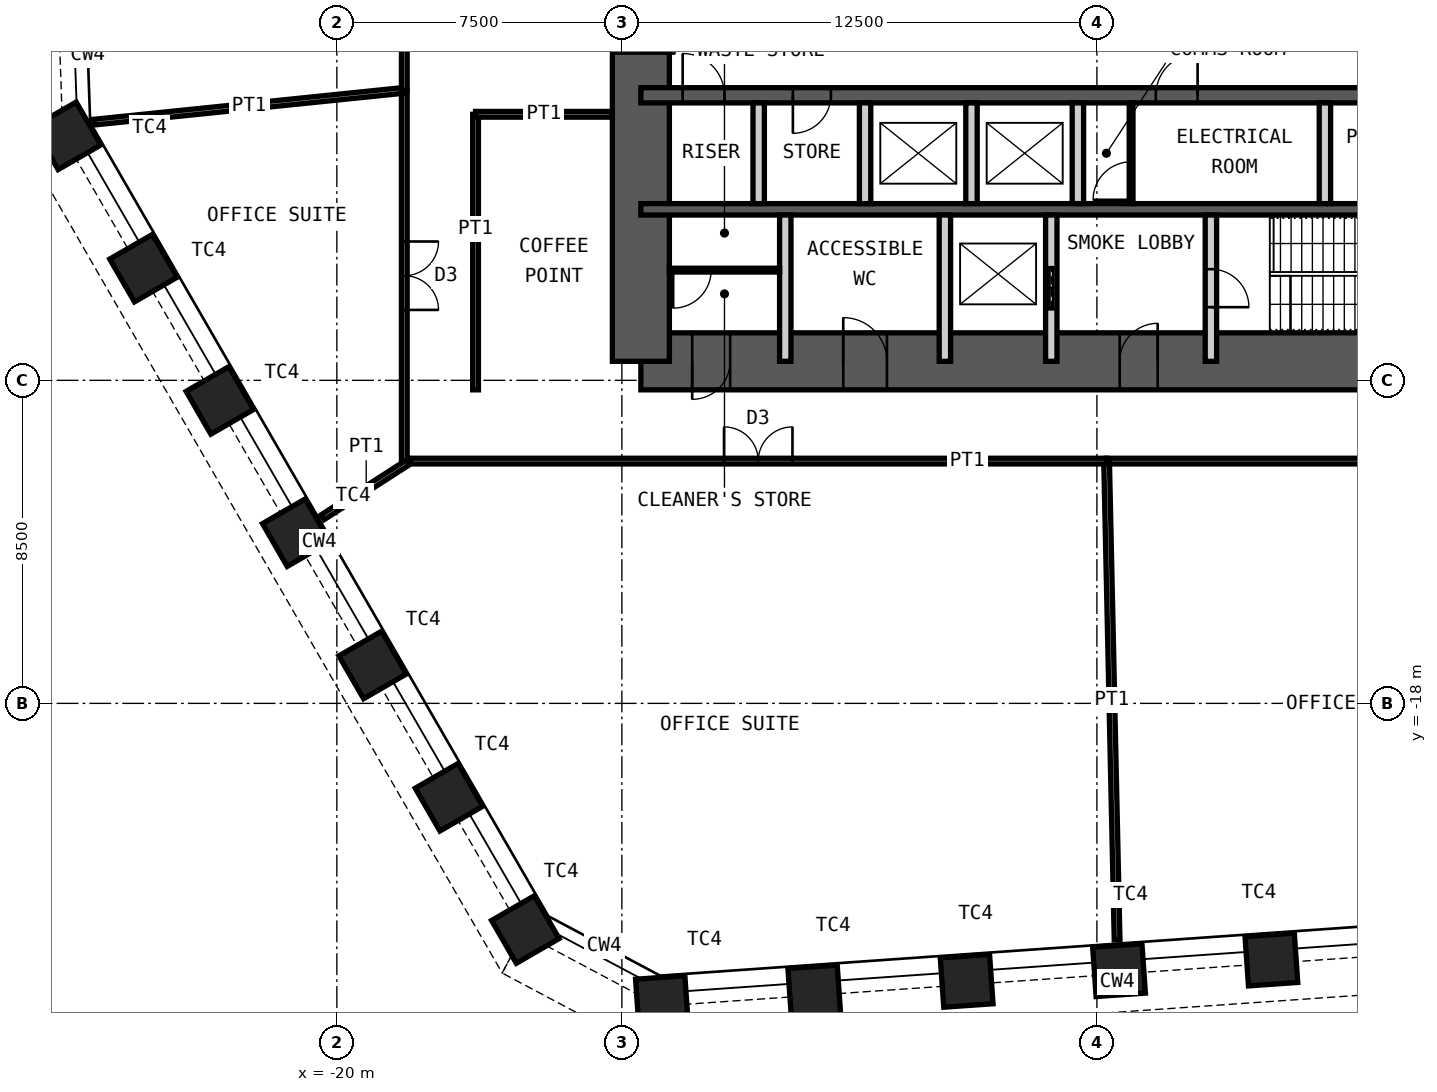
"""IFC4 building model, lengths in metres.
Left out: names, types, materials, properties, quantities, classifications, styles, units other than length and angle.
Written with IfcOpenShell. Run it as: python <this file> out.ifc"""

import sys

from ifc_helpers import new_model, si_unit, direction, frame, frame_2d, origin, origin_2d, place, context, subcontext, project, spatial, rectangle, hollow_rectangle, extrude, element, fill, save


model = new_model("IFC4")
c1 = context("Model", 3, precision=1e-05, world=origin(), true_north=direction((0.0, 1.0)))
c2 = subcontext(c1, "Body", "Model", "MODEL_VIEW")
j1 = project(units=[si_unit("LENGTHUNIT", "METRE"), si_unit("PLANEANGLEUNIT", "RADIAN")], contexts=[c1])
p1 = place(None, origin())
s1 = spatial("IfcSite", under=j1, at=p1, CompositionType="ELEMENT")
p2 = place(p1, origin())
s2 = spatial("IfcBuilding", under=s1, at=p2, CompositionType="ELEMENT")
p3 = place(p2, frame((0.0, 0.0, 140.8)))
s3 = spatial("IfcBuildingStorey", under=s2, at=p3, CompositionType="ELEMENT", Elevation=140.8)
for number, where, z_axis, x_axis in (
    (1, (4.592, -24.74, 0.0), (0.0, 0.0, 1.0), (0.998, 0.07, 0.0)),
    (2, (0.582, -25.02, 0.0), (0.0, 0.0, 1.0), (0.998, 0.07, 0.0)),
    (3, (-3.427, -25.301, 0.0), (0.0, 0.0, 1.0), (0.998, 0.07, 0.0)),
    (4, (-7.436, -25.581, 0.0), (0.0, 0.0, 1.0), (0.998, 0.07, 0.0)),
    (5, (-11.446, -25.861, 0.0), (0.0, 0.0, 1.0), (0.998, 0.07, 0.0)),
    (6, (-15.04, -23.95, 0.0), (0.0, 0.0, 1.0), (0.5, -0.866, 0.0)),
    (7, (-17.049, -20.47, 0.0), (0.0, 0.0, 1.0), (0.5, -0.866, 0.0)),
    (8, (-19.059, -16.989, 0.0), (0.0, 0.0, 1.0), (0.5, -0.866, 0.0)),
    (9, (-21.068, -13.509, 0.0), (0.0, 0.0, 1.0), (0.5, -0.866, 0.0)),
    (10, (-23.078, -10.028, 0.0), (0.0, 0.0, 1.0), (0.5, -0.866, 0.0)),
    (11, (-25.087, -6.547, 0.0), (0.0, 0.0, 1.0), (0.5, -0.866, 0.0)),
    (12, (-27.097, -3.067, 0.0), (0.0, 0.0, 1.0), (0.5, -0.866, 0.0)),
):
    element("IfcColumn", number, at=place(p3, frame(where, z_axis=z_axis, x_axis=x_axis)), inside=s3, PredefinedType="COLUMN", context=c2, shape_type="SweptSolid", body=[
        extrude(hollow_rectangle(XDim=1.3, YDim=1.3, WallThickness=0.1, at=origin_2d()), origin(), (0.0, 0.0, 1.0), 4.2),
    ])
p4 = place(p3, frame((-12.0, -9.0, 0.0), z_axis=(0.0, 0.0, 1.0), x_axis=(1.0, 0.0, 0.0)))
e13 = element("IfcWall", 13, at=p4, inside=s3, PredefinedType="SHEAR", context=c2, shape_type="SweptSolid", body=[
    extrude(rectangle(XDim=24.0, YDim=1.5, at=frame_2d((12.0, 0.0))), origin(), (0.0, 0.0, 1.0), 4.2),
])
p5 = place(p4, frame((1.35, 0.0, 0.0)))
e14 = element("IfcOpeningElement", 14, at=p5, cuts=e13, PredefinedType="OPENING", context=c2, shape_type="SweptSolid", body=[
    extrude(rectangle(XDim=1.0, YDim=2.1, at=frame_2d((0.5, 1.05))), frame((0.0, 0.76, 0.0), z_axis=(0.0, -1.0, 0.0), x_axis=(1.0, 0.0, 0.0)), (0.0, 0.0, 1.0), 1.52),
])
p6 = place(p4, frame((5.325, 0.0, 0.0)))
e15 = element("IfcOpeningElement", 15, at=p6, cuts=e13, PredefinedType="OPENING", context=c2, shape_type="SweptSolid", body=[
    extrude(rectangle(XDim=1.15, YDim=2.1, at=frame_2d((0.575, 1.05))), frame((0.0, 0.76, 0.0), z_axis=(0.0, -1.0, 0.0), x_axis=(1.0, 0.0, 0.0)), (0.0, 0.0, 1.0), 1.52),
])
p7 = place(p4, frame((12.6, 0.0, 0.0)))
e16 = element("IfcOpeningElement", 16, at=p7, cuts=e13, PredefinedType="OPENING", context=c2, shape_type="SweptSolid", body=[
    extrude(rectangle(XDim=1.0, YDim=2.1, at=frame_2d((0.5, 1.05))), frame((0.0, 0.76, 0.0), z_axis=(0.0, -1.0, 0.0), x_axis=(1.0, 0.0, 0.0)), (0.0, 0.0, 1.0), 1.52),
])
p8 = place(p3, frame((-12.0, -9.0, 0.0), z_axis=(0.0, 0.0, 1.0), x_axis=(0.0, 1.0, 0.0)))
e17 = element("IfcWall", 17, at=p8, inside=s3, PredefinedType="SHEAR", context=c2, shape_type="SweptSolid", body=[
    extrude(rectangle(XDim=18.0, YDim=1.5, at=frame_2d((9.0, 0.0))), origin(), (0.0, 0.0, 1.0), 4.2),
])
p9 = place(p8, frame((8.1, 0.0, 0.0)))
e18 = element("IfcOpeningElement", 18, at=p9, cuts=e17, PredefinedType="OPENING", context=c2, shape_type="SweptSolid", body=[
    extrude(rectangle(XDim=1.8, YDim=2.1, at=frame_2d((0.9, 1.05))), frame((0.0, 0.76, 0.0), z_axis=(0.0, -1.0, 0.0), x_axis=(1.0, 0.0, 0.0)), (0.0, 0.0, 1.0), 1.52),
])
p10 = place(p3, frame((-12.0, -2.0, 0.0), z_axis=(0.0, 0.0, 1.0), x_axis=(1.0, 0.0, 0.0)))
e19 = element("IfcWall", 19, at=p10, inside=s3, PredefinedType="SHEAR", context=c2, shape_type="SweptSolid", body=[
    extrude(rectangle(XDim=24.0, YDim=0.4, at=frame_2d((12.0, 0.0))), origin(), (0.0, 0.0, 1.0), 4.2),
])
p11 = place(p10, frame((1.1, 0.0, 0.0)))
e20 = element("IfcOpeningElement", 20, at=p11, cuts=e19, PredefinedType="OPENING", context=c2, shape_type="SweptSolid", body=[
    extrude(rectangle(XDim=1.1, YDim=2.1, at=frame_2d((0.55, 1.05))), frame((0.0, 0.21, 0.0), z_axis=(0.0, -1.0, 0.0), x_axis=(1.0, 0.0, 0.0)), (0.0, 0.0, 1.0), 0.42),
])
p12 = place(p10, frame((13.55, 0.0, 0.0)))
e21 = element("IfcOpeningElement", 21, at=p12, cuts=e19, PredefinedType="OPENING", context=c2, shape_type="SweptSolid", body=[
    extrude(rectangle(XDim=1.1, YDim=2.1, at=frame_2d((0.55, 1.05))), frame((0.0, 0.21, 0.0), z_axis=(0.0, -1.0, 0.0), x_axis=(1.0, 0.0, 0.0)), (0.0, 0.0, 1.0), 0.42),
])
p13 = place(p10, frame((20.7, 0.0, 0.0)))
e22 = element("IfcOpeningElement", 22, at=p13, cuts=e19, PredefinedType="OPENING", context=c2, shape_type="SweptSolid", body=[
    extrude(rectangle(XDim=1.1, YDim=2.1, at=frame_2d((0.55, 1.05))), frame((0.0, 0.21, 0.0), z_axis=(0.0, -1.0, 0.0), x_axis=(1.0, 0.0, 0.0)), (0.0, 0.0, 1.0), 0.42),
])
p14 = place(p10, frame((4.0, 0.0, 0.0)))
e23 = element("IfcOpeningElement", 23, at=p14, cuts=e19, PredefinedType="OPENING", context=c2, shape_type="SweptSolid", body=[
    extrude(rectangle(XDim=1.0, YDim=2.1, at=frame_2d((0.5, 1.05))), frame((0.0, 0.21, 0.0), z_axis=(0.0, -1.0, 0.0), x_axis=(1.0, 0.0, 0.0)), (0.0, 0.0, 1.0), 0.42),
])
p15 = place(p3, frame((-12.0, -5.0, 0.0), z_axis=(0.0, 0.0, 1.0), x_axis=(1.0, 0.0, 0.0)))
e24 = element("IfcWall", 24, at=p15, inside=s3, PredefinedType="SHEAR", context=c2, shape_type="SweptSolid", body=[
    extrude(rectangle(XDim=24.0, YDim=0.3, at=frame_2d((12.0, 0.0))), origin(), (0.0, 0.0, 1.0), 4.2),
])
for number, where, z_axis, x_axis in (
    (25, (-8.9, -4.85, 0.0), (0.0, 0.0, 1.0), (0.0, 1.0, 0.0)),
    (26, (-6.1, -4.85, 0.0), (0.0, 0.0, 1.0), (0.0, 1.0, 0.0)),
    (27, (-3.3, -4.85, 0.0), (0.0, 0.0, 1.0), (0.0, 1.0, 0.0)),
    (28, (-0.5, -4.85, 0.0), (0.0, 0.0, 1.0), (0.0, 1.0, 0.0)),
    (29, (6.0, -4.85, 0.0), (0.0, 0.0, 1.0), (0.0, 1.0, 0.0)),
):
    element("IfcWall", number, at=place(p3, frame(where, z_axis=z_axis, x_axis=x_axis)), inside=s3, PredefinedType="PARTITIONING", context=c2, shape_type="SweptSolid", body=[
        extrude(rectangle(XDim=2.65, YDim=0.3, at=frame_2d((1.325, 0.0))), origin(), (0.0, 0.0, 1.0), 3.98),
    ])
for number, where, z_axis, x_axis in (
    (30, (-8.2, -9.0, 0.0), (0.0, 0.0, 1.0), (0.0, 1.0, 0.0)),
    (31, (-4.0, -9.0, 0.0), (0.0, 0.0, 1.0), (0.0, 1.0, 0.0)),
):
    element("IfcWall", number, at=place(p3, frame(where, z_axis=z_axis, x_axis=x_axis)), inside=s3, PredefinedType="PARTITIONING", context=c2, shape_type="SweptSolid", body=[
        extrude(rectangle(XDim=3.85, YDim=0.3, at=frame_2d((1.925, 0.0))), origin(), (0.0, 0.0, 1.0), 3.98),
    ])
p16 = place(p3, frame((-1.2, -9.0, 0.0), z_axis=(0.0, 0.0, 1.0), x_axis=(0.0, 1.0, 0.0)))
e32 = element("IfcWall", 32, at=p16, inside=s3, PredefinedType="PARTITIONING", context=c2, shape_type="SweptSolid", body=[
    extrude(rectangle(XDim=3.85, YDim=0.3, at=frame_2d((1.925, 0.0))), origin(), (0.0, 0.0, 1.0), 3.98),
])
p17 = place(p16, frame((1.375, 0.0, 0.0)))
e33 = element("IfcOpeningElement", 33, at=p17, cuts=e32, PredefinedType="OPENING", context=c2, shape_type="SweptSolid", body=[
    extrude(rectangle(XDim=1.1, YDim=2.4, at=frame_2d((0.55, 1.2))), frame((0.0, 0.16, 0.0), z_axis=(0.0, -1.0, 0.0), x_axis=(1.0, 0.0, 0.0)), (0.0, 0.0, 1.0), 0.32),
])
p18 = place(p3, frame((3.0, -9.0, 0.0), z_axis=(0.0, 0.0, 1.0), x_axis=(0.0, 1.0, 0.0)))
e34 = element("IfcWall", 34, at=p18, inside=s3, PredefinedType="PARTITIONING", context=c2, shape_type="SweptSolid", body=[
    extrude(rectangle(XDim=3.85, YDim=0.3, at=frame_2d((1.925, 0.0))), origin(), (0.0, 0.0, 1.0), 3.98),
])
p19 = place(p18, frame((1.425, 0.0, 0.0)))
e35 = element("IfcOpeningElement", 35, at=p19, cuts=e34, PredefinedType="OPENING", context=c2, shape_type="SweptSolid", body=[
    extrude(rectangle(XDim=1.0, YDim=2.1, at=frame_2d((0.5, 1.05))), frame((0.0, 0.16, 0.0), z_axis=(0.0, -1.0, 0.0), x_axis=(1.0, 0.0, 0.0)), (0.0, 0.0, 1.0), 0.32),
])
p20 = place(p3, frame((0.9, -4.85, 0.0), z_axis=(0.0, 0.0, 1.0), x_axis=(0.0, 1.0, 0.0)))
e36 = element("IfcWall", 36, at=p20, inside=s3, PredefinedType="PARTITIONING", context=c2, shape_type="SweptSolid", body=[
    extrude(rectangle(XDim=2.65, YDim=0.1, at=frame_2d((1.325, 0.0))), origin(), (0.0, 0.0, 1.0), 3.98),
])
p21 = place(p20, frame((0.1, 0.0, 0.0)))
e37 = element("IfcOpeningElement", 37, at=p21, cuts=e36, PredefinedType="OPENING", context=c2, shape_type="SweptSolid", body=[
    extrude(rectangle(XDim=1.0, YDim=2.4, at=frame_2d((0.5, 1.2))), frame((0.0, 0.06, 0.0), z_axis=(0.0, -1.0, 0.0), x_axis=(1.0, 0.0, 0.0)), (0.0, 0.0, 1.0), 0.12),
])
p22 = place(p3, frame((-11.25, -6.6, 0.0), z_axis=(0.0, 0.0, 1.0), x_axis=(1.0, 0.0, 0.0)))
e38 = element("IfcWall", 38, at=p22, inside=s3, PredefinedType="PARTITIONING", context=c2, shape_type="SweptSolid", body=[
    extrude(rectangle(XDim=2.9, YDim=0.1, at=frame_2d((1.45, 0.0))), origin(), (0.0, 0.0, 1.0), 3.98),
])
p23 = place(p22, frame((0.1, 0.0, 0.0)))
e39 = element("IfcOpeningElement", 39, at=p23, cuts=e38, PredefinedType="OPENING", context=c2, shape_type="SweptSolid", body=[
    extrude(rectangle(XDim=1.0, YDim=2.4, at=frame_2d((0.5, 1.2))), frame((0.0, 0.06, 0.0), z_axis=(0.0, -1.0, 0.0), x_axis=(1.0, 0.0, 0.0)), (0.0, 0.0, 1.0), 0.12),
])
p24 = place(p3, frame((17.625, -11.625, 0.0), z_axis=(0.0, 0.0, 1.0), x_axis=(-1.0, 0.0, 0.0)))
e40 = element("IfcWall", 40, at=p24, inside=s3, PredefinedType="PARTITIONING", context=c2, shape_type="SweptSolid", body=[
    extrude(rectangle(XDim=17.37, YDim=0.15, at=frame_2d((8.685, 0.0))), origin(), (0.0, 0.0, 1.0), 4.03),
])
p25 = place(p24, frame((7.785, 0.0, 0.0)))
e41 = element("IfcOpeningElement", 41, at=p25, cuts=e40, PredefinedType="OPENING", context=c2, shape_type="SweptSolid", body=[
    extrude(rectangle(XDim=1.8, YDim=2.4, at=frame_2d((0.9, 1.2))), frame((0.0, 0.085, 0.0), z_axis=(0.0, -1.0, 0.0), x_axis=(1.0, 0.0, 0.0)), (0.0, 0.0, 1.0), 0.17),
])
p26 = place(p3, frame((0.531, -24.222, 0.0), z_axis=(0.0, 0.0, 1.0), x_axis=(-0.021933557026, 0.999759430601, 0.0)))
e42 = element("IfcWall", 42, at=p26, inside=s3, PredefinedType="PARTITIONING", context=c2, shape_type="SweptSolid", body=[
    extrude(rectangle(XDim=12.6, YDim=0.15, at=frame_2d((6.3, 0.0))), origin(), (0.0, 0.0, 1.0), 3.33),
])
p27 = place(p3, frame((0.255, -11.625, 0.0), z_axis=(0.0, 0.0, 1.0), x_axis=(-1.0, 0.0, 0.0)))
e43 = element("IfcWall", 43, at=p27, inside=s3, PredefinedType="PARTITIONING", context=c2, shape_type="SweptSolid", body=[
    extrude(rectangle(XDim=18.332, YDim=0.15, at=frame_2d((9.166, 0.0))), origin(), (0.0, 0.0, 1.0), 4.03),
])
p28 = place(p27, frame((8.266, 0.0, 0.0)))
e44 = element("IfcOpeningElement", 44, at=p28, cuts=e43, PredefinedType="OPENING", context=c2, shape_type="SweptSolid", body=[
    extrude(rectangle(XDim=1.8, YDim=2.4, at=frame_2d((0.9, 1.2))), frame((0.0, 0.085, 0.0), z_axis=(0.0, -1.0, 0.0), x_axis=(1.0, 0.0, 0.0)), (0.0, 0.0, 1.0), 0.17),
])
p29 = place(p3, frame((-20.378, -13.104, 0.0), z_axis=(0.0, 0.0, 1.0), x_axis=(0.841108871346, 0.540865848934, 0.0)))
e45 = element("IfcWall", 45, at=p29, inside=s3, PredefinedType="PARTITIONING", context=c2, shape_type="SweptSolid", body=[
    extrude(rectangle(XDim=2.735, YDim=0.15, at=frame_2d((1.368, 0.0))), origin(), (0.0, 0.0, 1.0), 3.33),
])
p30 = place(p3, frame((-18.225, -11.625, 0.0), z_axis=(0.0, 0.0, 1.0), x_axis=(0.0, 1.0, 0.0)))
e46 = element("IfcWall", 46, at=p30, inside=s3, PredefinedType="PARTITIONING", context=c2, shape_type="SweptSolid", body=[
    extrude(rectangle(XDim=9.756, YDim=0.15, at=frame_2d((4.878, 0.0))), origin(), (0.0, 0.0, 1.0), 4.03),
])
p31 = place(p30, frame((3.978, 0.0, 0.0)))
e47 = element("IfcOpeningElement", 47, at=p31, cuts=e46, PredefinedType="OPENING", context=c2, shape_type="SweptSolid", body=[
    extrude(rectangle(XDim=1.8, YDim=2.4, at=frame_2d((0.9, 1.2))), frame((0.0, 0.085, 0.0), z_axis=(0.0, -1.0, 0.0), x_axis=(1.0, 0.0, 0.0)), (0.0, 0.0, 1.0), 0.17),
])
p32 = place(p3, frame((-26.391, -2.706, 0.0), z_axis=(0.0, 0.0, 1.0), x_axis=(0.994783450774, 0.102009245004, 0.0)))
e48 = element("IfcWall", 48, at=p32, inside=s3, PredefinedType="PARTITIONING", context=c2, shape_type="SweptSolid", body=[
    extrude(rectangle(XDim=8.209, YDim=0.15, at=frame_2d((4.104, 0.0))), origin(), (0.0, 0.0, 1.0), 2.93),
])
p33 = place(p3, frame((-18.225, -1.869, 0.0), z_axis=(0.0, 0.0, 1.0), x_axis=(0.0, 1.0, 0.0)))
e49 = element("IfcWall", 49, at=p33, inside=s3, PredefinedType="PARTITIONING", context=c2, shape_type="SweptSolid", body=[
    extrude(rectangle(XDim=11.865, YDim=0.15, at=frame_2d((5.932, 0.0))), origin(), (0.0, 0.0, 1.0), 4.03),
])
p34 = place(p33, frame((5.032, 0.0, 0.0)))
e50 = element("IfcOpeningElement", 50, at=p34, cuts=e49, PredefinedType="OPENING", context=c2, shape_type="SweptSolid", body=[
    extrude(rectangle(XDim=1.8, YDim=2.4, at=frame_2d((0.9, 1.2))), frame((0.0, 0.085, 0.0), z_axis=(0.0, -1.0, 0.0), x_axis=(1.0, 0.0, 0.0)), (0.0, 0.0, 1.0), 0.17),
])
p35 = place(p3, frame((-16.35, -9.75, 0.0), z_axis=(0.0, 0.0, 1.0), x_axis=(0.0, 1.0, 0.0)))
e51 = element("IfcWall", 51, at=p35, inside=s3, PredefinedType="PARTITIONING", context=c2, shape_type="SweptSolid", body=[
    extrude(rectangle(XDim=7.25, YDim=0.15, at=frame_2d((3.625, 0.0))), origin(), (0.0, 0.0, 1.0), 4.03),
])
p36 = place(p3, frame((-12.75, -2.5, 0.0), z_axis=(0.0, 0.0, 1.0), x_axis=(-1.0, 0.0, 0.0)))
e52 = element("IfcWall", 52, at=p36, inside=s3, PredefinedType="PARTITIONING", context=c2, shape_type="SweptSolid", body=[
    extrude(rectangle(XDim=3.6, YDim=0.15, at=frame_2d((1.8, 0.0))), origin(), (0.0, 0.0, 1.0), 3.33),
])
p37 = place(p5, origin())
e53 = element("IfcDoor", 53, at=p37, inside=s3, OperationType="SINGLE_SWING_LEFT", PredefinedType="DOOR", context=c2, shape_type="SweptSolid", body=[
    extrude(rectangle(XDim=1.0, YDim=2.1, at=frame_2d((0.5, 1.05))), frame((0.0, 0.025, 0.0), z_axis=(0.0, -1.0, 0.0), x_axis=(1.0, 0.0, 0.0)), (0.0, 0.0, 1.0), 0.05),
])
fill(e14, e53)
p38 = place(p6, origin())
e54 = element("IfcDoor", 54, at=p38, inside=s3, OperationType="SINGLE_SWING_RIGHT", PredefinedType="DOOR", context=c2, shape_type="SweptSolid", body=[
    extrude(rectangle(XDim=1.15, YDim=2.1, at=frame_2d((0.575, 1.05))), frame((0.0, 0.025, 0.0), z_axis=(0.0, -1.0, 0.0), x_axis=(1.0, 0.0, 0.0)), (0.0, 0.0, 1.0), 0.05),
])
fill(e15, e54)
p39 = place(p7, origin())
e55 = element("IfcDoor", 55, at=p39, inside=s3, OperationType="SINGLE_SWING_LEFT", PredefinedType="DOOR", context=c2, shape_type="SweptSolid", body=[
    extrude(rectangle(XDim=1.0, YDim=2.1, at=frame_2d((0.5, 1.05))), frame((0.0, 0.025, 0.0), z_axis=(0.0, -1.0, 0.0), x_axis=(1.0, 0.0, 0.0)), (0.0, 0.0, 1.0), 0.05),
])
fill(e16, e55)
p40 = place(p19, origin())
e56 = element("IfcDoor", 56, at=p40, inside=s3, OperationType="SINGLE_SWING_LEFT", PredefinedType="DOOR", context=c2, shape_type="SweptSolid", body=[
    extrude(rectangle(XDim=1.0, YDim=2.1, at=frame_2d((0.5, 1.05))), frame((0.0, 0.025, 0.0), z_axis=(0.0, -1.0, 0.0), x_axis=(1.0, 0.0, 0.0)), (0.0, 0.0, 1.0), 0.05),
])
fill(e35, e56)
p41 = place(p11, origin())
e57 = element("IfcDoor", 57, at=p41, inside=s3, OperationType="SINGLE_SWING_RIGHT", PredefinedType="DOOR", context=c2, shape_type="SweptSolid", body=[
    extrude(rectangle(XDim=1.1, YDim=2.1, at=frame_2d((0.55, 1.05))), frame((0.0, 0.025, 0.0), z_axis=(0.0, -1.0, 0.0), x_axis=(1.0, 0.0, 0.0)), (0.0, 0.0, 1.0), 0.05),
])
fill(e20, e57)
p42 = place(p12, origin())
e58 = element("IfcDoor", 58, at=p42, inside=s3, OperationType="SINGLE_SWING_LEFT", PredefinedType="DOOR", context=c2, shape_type="SweptSolid", body=[
    extrude(rectangle(XDim=1.1, YDim=2.1, at=frame_2d((0.55, 1.05))), frame((0.0, 0.025, 0.0), z_axis=(0.0, -1.0, 0.0), x_axis=(1.0, 0.0, 0.0)), (0.0, 0.0, 1.0), 0.05),
])
fill(e21, e58)
p43 = place(p9, origin())
e59 = element("IfcDoor", 59, at=p43, inside=s3, OperationType="DOUBLE_DOOR_DOUBLE_SWING", PredefinedType="DOOR", context=c2, shape_type="SweptSolid", body=[
    extrude(rectangle(XDim=1.8, YDim=2.1, at=frame_2d((0.9, 1.05))), frame((0.0, 0.025, 0.0), z_axis=(0.0, -1.0, 0.0), x_axis=(1.0, 0.0, 0.0)), (0.0, 0.0, 1.0), 0.05),
])
fill(e18, e59)
p44 = place(p17, origin())
e60 = element("IfcDoor", 60, at=p44, inside=s3, OperationType="DOUBLE_DOOR_SLIDING", PredefinedType="DOOR", context=c2, shape_type="SweptSolid", body=[
    extrude(rectangle(XDim=1.1, YDim=2.4, at=frame_2d((0.55, 1.2))), frame((0.0, 0.025, 0.0), z_axis=(0.0, -1.0, 0.0), x_axis=(1.0, 0.0, 0.0)), (0.0, 0.0, 1.0), 0.05),
])
fill(e33, e60)
p45 = place(p14, origin())
e61 = element("IfcDoor", 61, at=p45, inside=s3, OperationType="SINGLE_SWING_LEFT", PredefinedType="DOOR", context=c2, shape_type="SweptSolid", body=[
    extrude(rectangle(XDim=1.0, YDim=2.1, at=frame_2d((0.5, 1.05))), frame((0.0, 0.025, 0.0), z_axis=(0.0, -1.0, 0.0), x_axis=(1.0, 0.0, 0.0)), (0.0, 0.0, 1.0), 0.05),
])
fill(e23, e61)
p46 = place(p21, origin())
e62 = element("IfcDoor", 62, at=p46, inside=s3, OperationType="SINGLE_SWING_RIGHT", PredefinedType="DOOR", context=c2, shape_type="SweptSolid", body=[
    extrude(rectangle(XDim=1.0, YDim=2.4, at=frame_2d((0.5, 1.2))), frame((0.0, 0.025, 0.0), z_axis=(0.0, -1.0, 0.0), x_axis=(1.0, 0.0, 0.0)), (0.0, 0.0, 1.0), 0.05),
])
fill(e37, e62)
p47 = place(p23, origin())
e63 = element("IfcDoor", 63, at=p47, inside=s3, OperationType="SINGLE_SWING_LEFT", PredefinedType="DOOR", context=c2, shape_type="SweptSolid", body=[
    extrude(rectangle(XDim=1.0, YDim=2.4, at=frame_2d((0.5, 1.2))), frame((0.0, 0.025, 0.0), z_axis=(0.0, -1.0, 0.0), x_axis=(1.0, 0.0, 0.0)), (0.0, 0.0, 1.0), 0.05),
])
fill(e39, e63)
p48 = place(p28, origin())
e64 = element("IfcDoor", 64, at=p48, inside=s3, OperationType="DOUBLE_DOOR_DOUBLE_SWING", PredefinedType="DOOR", context=c2, shape_type="SweptSolid", body=[
    extrude(rectangle(XDim=1.8, YDim=2.4, at=frame_2d((0.9, 1.2))), frame((0.0, 0.025, 0.0), z_axis=(0.0, -1.0, 0.0), x_axis=(1.0, 0.0, 0.0)), (0.0, 0.0, 1.0), 0.05),
])
fill(e44, e64)
p49 = place(p31, origin())
e65 = element("IfcDoor", 65, at=p49, inside=s3, OperationType="DOUBLE_DOOR_DOUBLE_SWING", PredefinedType="DOOR", context=c2, shape_type="SweptSolid", body=[
    extrude(rectangle(XDim=1.8, YDim=2.4, at=frame_2d((0.9, 1.2))), frame((0.0, 0.025, 0.0), z_axis=(0.0, -1.0, 0.0), x_axis=(1.0, 0.0, 0.0)), (0.0, 0.0, 1.0), 0.05),
])
fill(e47, e65)
save(model, sys.argv[1])
